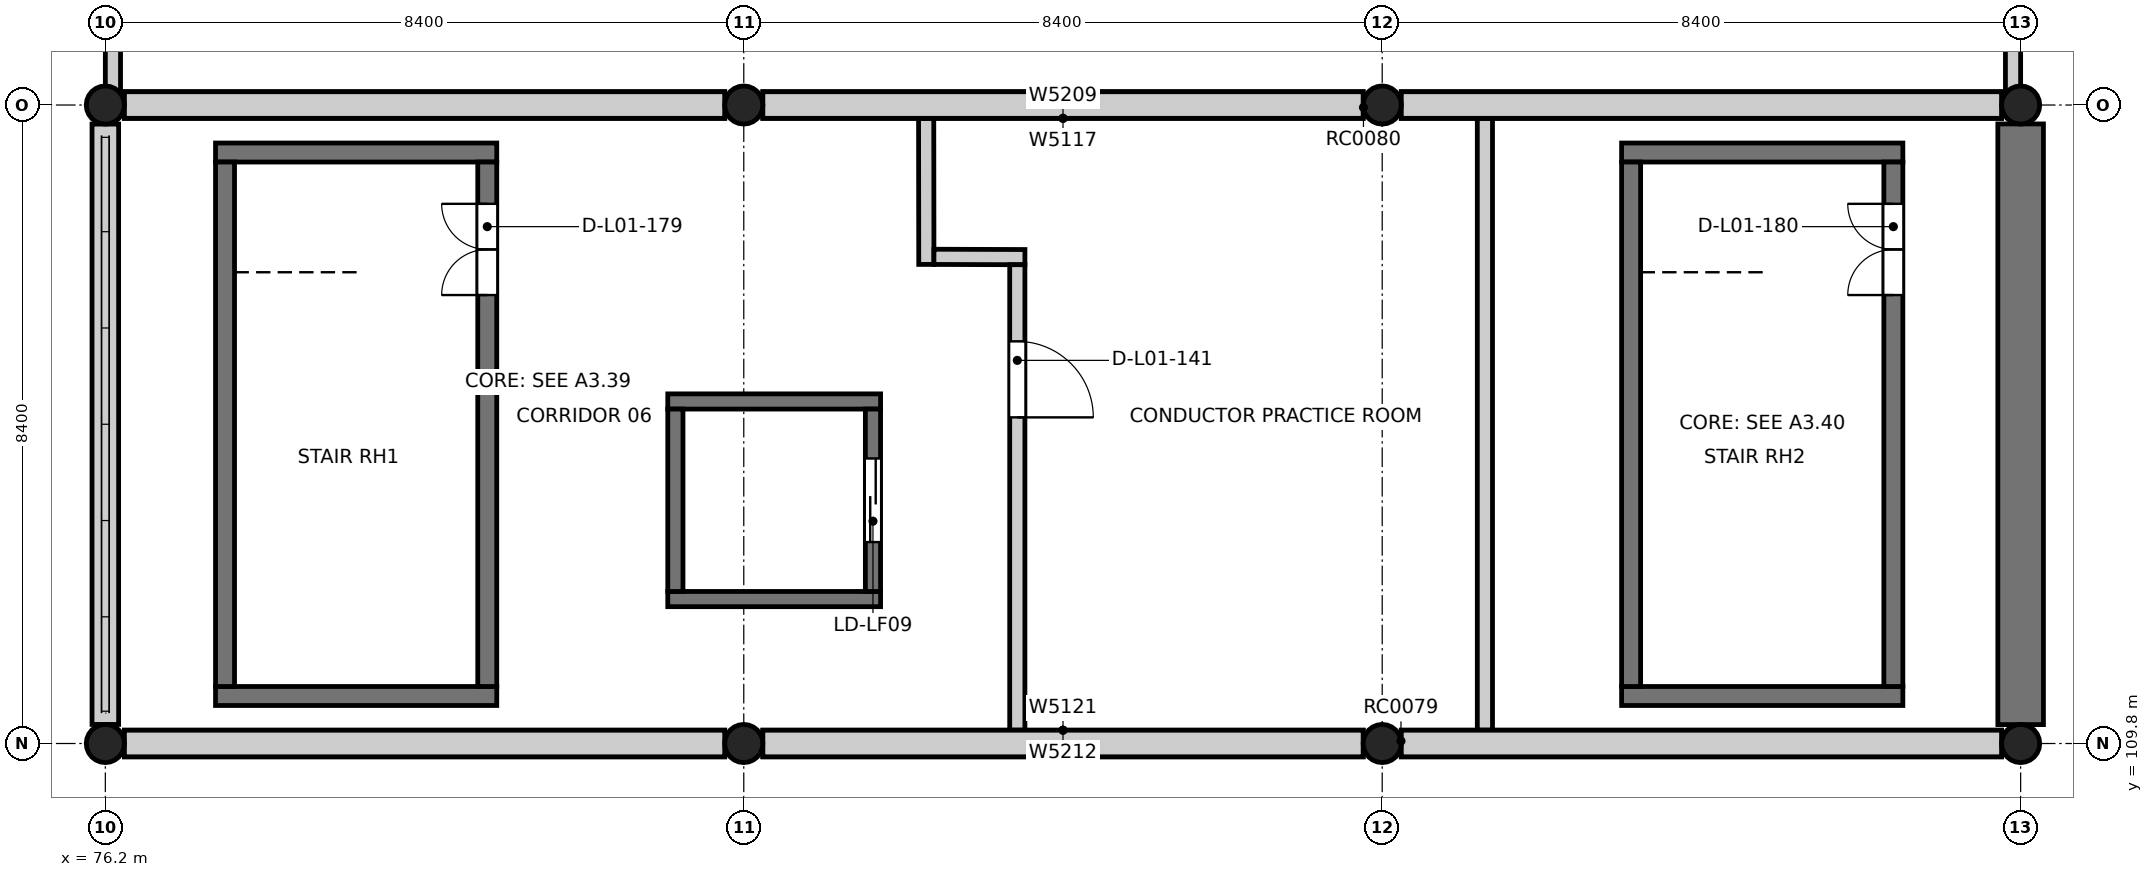
"""IFC4 building model, lengths in metres.
Left out: names, types, materials, properties, quantities, classifications, styles, units other than length and angle.
Written with IfcOpenShell. Run it as: python <this file> out.ifc"""

import sys

from ifc_helpers import new_model, si_unit, direction, frame, frame_2d, origin, origin_2d, place, context, subcontext, project, spatial, rectangle, circle, extrude, element, fill, save


model = new_model("IFC4")
c1 = context("Model", 3, precision=1e-05, world=origin(), true_north=direction((0.0, 1.0)))
c2 = subcontext(c1, "Body", "Model", "MODEL_VIEW")
j1 = project(units=[si_unit("LENGTHUNIT", "METRE"), si_unit("PLANEANGLEUNIT", "RADIAN")], contexts=[c1])
p1 = place(None, origin())
s1 = spatial("IfcSite", under=j1, at=p1, CompositionType="ELEMENT")
p2 = place(p1, origin())
s2 = spatial("IfcBuilding", under=s1, at=p2, CompositionType="ELEMENT")
p3 = place(p2, frame((0.0, 0.0, 4.8)))
s3 = spatial("IfcBuildingStorey", under=s2, at=p3, CompositionType="ELEMENT", Elevation=4.8)
for number, where, z_axis, x_axis in (
    (1, (76.2, 109.8, 0.0), (0.0, 0.0, 1.0), (1.0, 0.0, 0.0)),
    (2, (76.2, 118.2, 0.0), (0.0, 0.0, 1.0), (1.0, 0.0, 0.0)),
    (3, (84.6, 109.8, 0.0), (0.0, 0.0, 1.0), (1.0, 0.0, 0.0)),
    (4, (84.6, 118.2, 0.0), (0.0, 0.0, 1.0), (1.0, 0.0, 0.0)),
    (5, (93.0, 109.8, 0.0), (0.0, 0.0, 1.0), (1.0, 0.0, 0.0)),
    (6, (93.0, 118.2, 0.0), (0.0, 0.0, 1.0), (1.0, 0.0, 0.0)),
):
    element("IfcColumn", number, at=place(p3, frame(where, z_axis=z_axis, x_axis=x_axis)), inside=s3, PredefinedType="COLUMN", context=c2, shape_type="SweptSolid", body=[
        extrude(circle(Radius=0.25, at=origin_2d()), origin(), (0.0, 0.0, 1.0), 7.724),
    ])
for number, where, z_axis, x_axis in (
    (7, (101.4, 109.8, 0.0), (0.0, 0.0, 1.0), (1.0, 0.0, 0.0)),
    (8, (101.4, 118.2, 0.0), (0.0, 0.0, 1.0), (1.0, 0.0, 0.0)),
):
    element("IfcColumn", number, at=place(p3, frame(where, z_axis=z_axis, x_axis=x_axis)), inside=s3, PredefinedType="COLUMN", context=c2, shape_type="SweptSolid", body=[
        extrude(circle(Radius=0.25, at=origin_2d()), origin(), (0.0, 0.0, 1.0), 4.124),
    ])
p4 = place(p3, frame((101.4, 110.049, 0.0), z_axis=(0.0, 0.0, 1.0), x_axis=(0.0, 1.0, 0.0)))
e9 = element("IfcWall", 9, at=p4, inside=s3, PredefinedType="SOLIDWALL", context=c2, shape_type="SweptSolid", body=[
    extrude(rectangle(XDim=7.902, YDim=0.6, at=frame_2d((3.951, 0.0))), origin(), (0.0, 0.0, 1.0), 9.6),
])
for number, where, z_axis, x_axis in (
    (10, (77.65, 110.425, 0.0), (0.0, 0.0, 1.0), (1.0, 0.0, 0.0)),
    (11, (77.65, 117.575, 0.0), (0.0, 0.0, 1.0), (1.0, 0.0, 0.0)),
):
    element("IfcWall", number, at=place(p3, frame(where, z_axis=z_axis, x_axis=x_axis)), inside=s3, PredefinedType="SOLIDWALL", context=c2, shape_type="SweptSolid", body=[
        extrude(rectangle(XDim=3.7, YDim=0.25, at=frame_2d((1.85, 0.0))), origin(), (0.0, 0.0, 1.0), 4.8),
    ])
p5 = place(p3, frame((77.775, 110.55, 0.0), z_axis=(0.0, 0.0, 1.0), x_axis=(0.0, 1.0, 0.0)))
e12 = element("IfcWall", 12, at=p5, inside=s3, PredefinedType="SOLIDWALL", context=c2, shape_type="SweptSolid", body=[
    extrude(rectangle(XDim=6.9, YDim=0.25, at=frame_2d((3.45, 0.0))), origin(), (0.0, 0.0, 1.0), 4.8),
])
p6 = place(p3, frame((81.225, 110.55, 0.0), z_axis=(0.0, 0.0, 1.0), x_axis=(0.0, 1.0, 0.0)))
e13 = element("IfcWall", 13, at=p6, inside=s3, PredefinedType="SOLIDWALL", context=c2, shape_type="SweptSolid", body=[
    extrude(rectangle(XDim=6.9, YDim=0.25, at=frame_2d((3.45, 0.0))), origin(), (0.0, 0.0, 1.0), 4.8),
])
p7 = place(p6, frame((5.15, 0.0, 0.0)))
e14 = element("IfcOpeningElement", 14, at=p7, cuts=e13, PredefinedType="OPENING", context=c2, shape_type="SweptSolid", body=[
    extrude(rectangle(XDim=1.2, YDim=2.1, at=frame_2d((0.6, 1.05))), frame((0.0, 0.135, 0.0), z_axis=(0.0, -1.0, 0.0), x_axis=(1.0, 0.0, 0.0)), (0.0, 0.0, 1.0), 0.27),
])
for number, where, z_axis, x_axis in (
    (15, (96.15, 110.425, 0.0), (0.0, 0.0, 1.0), (1.0, 0.0, 0.0)),
    (16, (96.15, 117.575, 0.0), (0.0, 0.0, 1.0), (1.0, 0.0, 0.0)),
):
    element("IfcWall", number, at=place(p3, frame(where, z_axis=z_axis, x_axis=x_axis)), inside=s3, PredefinedType="SOLIDWALL", context=c2, shape_type="SweptSolid", body=[
        extrude(rectangle(XDim=3.7, YDim=0.25, at=frame_2d((1.85, 0.0))), origin(), (0.0, 0.0, 1.0), 4.8),
    ])
p8 = place(p3, frame((96.275, 110.55, 0.0), z_axis=(0.0, 0.0, 1.0), x_axis=(0.0, 1.0, 0.0)))
e17 = element("IfcWall", 17, at=p8, inside=s3, PredefinedType="SOLIDWALL", context=c2, shape_type="SweptSolid", body=[
    extrude(rectangle(XDim=6.9, YDim=0.25, at=frame_2d((3.45, 0.0))), origin(), (0.0, 0.0, 1.0), 4.8),
])
p9 = place(p3, frame((99.725, 110.55, 0.0), z_axis=(0.0, 0.0, 1.0), x_axis=(0.0, 1.0, 0.0)))
e18 = element("IfcWall", 18, at=p9, inside=s3, PredefinedType="SOLIDWALL", context=c2, shape_type="SweptSolid", body=[
    extrude(rectangle(XDim=6.9, YDim=0.25, at=frame_2d((3.45, 0.0))), origin(), (0.0, 0.0, 1.0), 4.8),
])
p10 = place(p9, frame((5.15, 0.0, 0.0)))
e19 = element("IfcOpeningElement", 19, at=p10, cuts=e18, PredefinedType="OPENING", context=c2, shape_type="SweptSolid", body=[
    extrude(rectangle(XDim=1.2, YDim=2.1, at=frame_2d((0.6, 1.05))), frame((0.0, 0.135, 0.0), z_axis=(0.0, -1.0, 0.0), x_axis=(1.0, 0.0, 0.0)), (0.0, 0.0, 1.0), 0.27),
])
for number, where, z_axis, x_axis in (
    (20, (83.6, 111.7, 0.0), (0.0, 0.0, 1.0), (1.0, 0.0, 0.0)),
    (21, (83.6, 114.3, 0.0), (0.0, 0.0, 1.0), (1.0, 0.0, 0.0)),
):
    element("IfcWall", number, at=place(p3, frame(where, z_axis=z_axis, x_axis=x_axis)), inside=s3, PredefinedType="SOLIDWALL", context=c2, shape_type="SweptSolid", body=[
        extrude(rectangle(XDim=2.8, YDim=0.2, at=frame_2d((1.4, 0.0))), origin(), (0.0, 0.0, 1.0), 4.8),
    ])
p11 = place(p3, frame((83.7, 111.8, 0.0), z_axis=(0.0, 0.0, 1.0), x_axis=(0.0, 1.0, 0.0)))
e22 = element("IfcWall", 22, at=p11, inside=s3, PredefinedType="SOLIDWALL", context=c2, shape_type="SweptSolid", body=[
    extrude(rectangle(XDim=2.4, YDim=0.2, at=frame_2d((1.2, 0.0))), origin(), (0.0, 0.0, 1.0), 4.8),
])
p12 = place(p3, frame((86.3, 111.8, 0.0), z_axis=(0.0, 0.0, 1.0), x_axis=(0.0, 1.0, 0.0)))
e23 = element("IfcWall", 23, at=p12, inside=s3, PredefinedType="SOLIDWALL", context=c2, shape_type="SweptSolid", body=[
    extrude(rectangle(XDim=2.4, YDim=0.2, at=frame_2d((1.2, 0.0))), origin(), (0.0, 0.0, 1.0), 4.8),
])
p13 = place(p12, frame((0.65, 0.0, 0.0)))
e24 = element("IfcOpeningElement", 24, at=p13, cuts=e23, PredefinedType="OPENING", context=c2, shape_type="SweptSolid", body=[
    extrude(rectangle(XDim=1.1, YDim=2.1, at=frame_2d((0.55, 1.05))), frame((0.0, 0.11, 0.0), z_axis=(0.0, -1.0, 0.0), x_axis=(1.0, 0.0, 0.0)), (0.0, 0.0, 1.0), 0.22),
])
p14 = place(p3, frame((87.0, 118.025, 0.0), z_axis=(0.0, 0.0, 1.0), x_axis=(0.001270324178, -0.999999193138, 0.0)))
e25 = element("IfcWall", 25, at=p14, inside=s3, PredefinedType="PARTITIONING", context=c2, shape_type="SweptSolid", body=[
    extrude(rectangle(XDim=1.922, YDim=0.2, at=frame_2d((0.961, 0.0))), origin(), (0.0, 0.0, 1.0), 4.6),
])
p15 = place(p3, frame((87.102, 116.203, 0.0), z_axis=(0.0, 0.0, 1.0), x_axis=(0.999994675452, -0.003263290803, 0.0)))
e26 = element("IfcWall", 26, at=p15, inside=s3, PredefinedType="PARTITIONING", context=c2, shape_type="SweptSolid", body=[
    extrude(rectangle(XDim=1.197, YDim=0.2, at=frame_2d((0.599, 0.0))), origin(), (0.0, 0.0, 1.0), 4.6),
])
p16 = place(p3, frame((88.199, 116.099, 0.0), z_axis=(0.0, 0.0, 1.0), x_axis=(0.0, -1.0, 0.0)))
e27 = element("IfcWall", 27, at=p16, inside=s3, PredefinedType="PARTITIONING", context=c2, shape_type="SweptSolid", body=[
    extrude(rectangle(XDim=6.124, YDim=0.2, at=frame_2d((3.062, 0.0))), origin(), (0.0, 0.0, 1.0), 4.081),
])
p17 = place(p16, frame((1.009, 0.0, 0.0)))
e28 = element("IfcOpeningElement", 28, at=p17, cuts=e27, PredefinedType="OPENING", context=c2, shape_type="SweptSolid", body=[
    extrude(rectangle(XDim=1.0, YDim=2.1, at=frame_2d((0.5, 1.05))), frame((0.0, 0.11, 0.0), z_axis=(0.0, -1.0, 0.0), x_axis=(1.0, 0.0, 0.0)), (0.0, 0.0, 1.0), 0.22),
])
p18 = place(p3, frame((94.351, 109.975, 0.0), z_axis=(0.0, 0.0, 1.0), x_axis=(0.0, 1.0, 0.0)))
e29 = element("IfcWall", 29, at=p18, inside=s3, PredefinedType="PARTITIONING", context=c2, shape_type="SweptSolid", body=[
    extrude(rectangle(XDim=8.05, YDim=0.2, at=frame_2d((4.025, 0.0))), origin(), (0.0, 0.0, 1.0), 4.23),
])
for number, where, z_axis, x_axis in (
    (30, (101.149, 118.2, 0.0), (0.0, 0.0, 1.0), (-1.0, 0.0, 0.0)),
    (31, (92.749, 118.2, 0.0), (0.0, 0.0, 1.0), (-1.0, 0.0, 0.0)),
):
    element("IfcWall", number, at=place(p3, frame(where, z_axis=z_axis, x_axis=x_axis)), inside=s3, PredefinedType="SOLIDWALL", context=c2, shape_type="SweptSolid", body=[
        extrude(rectangle(XDim=7.898, YDim=0.35, at=frame_2d((3.949, 0.0))), origin(), (0.0, 0.0, 1.0), 3.9),
    ])
p19 = place(p3, frame((84.349, 118.2, 0.0), z_axis=(0.0, 0.0, 1.0), x_axis=(-1.0, 0.0, 0.0)))
e32 = element("IfcWall", 32, at=p19, inside=s3, PredefinedType="SOLIDWALL", context=c2, shape_type="SweptSolid", body=[
    extrude(rectangle(XDim=7.898, YDim=0.35, at=frame_2d((3.949, 0.0))), origin(), (0.0, 0.0, 1.0), 3.9),
])
p20 = place(p3, frame((76.2, 117.949, 0.0), z_axis=(0.0, 0.0, 1.0), x_axis=(0.0, -1.0, 0.0)))
e33 = element("IfcWall", 33, at=p20, inside=s3, PredefinedType="SOLIDWALL", context=c2, shape_type="SweptSolid", body=[
    extrude(rectangle(XDim=7.898, YDim=0.35, at=frame_2d((3.949, 0.0))), origin(), (0.0, 0.0, 1.0), 3.9),
])
p21 = place(p3, frame((76.451, 109.8, 0.0), z_axis=(0.0, 0.0, 1.0), x_axis=(1.0, 0.0, 0.0)))
e34 = element("IfcWall", 34, at=p21, inside=s3, PredefinedType="SOLIDWALL", context=c2, shape_type="SweptSolid", body=[
    extrude(rectangle(XDim=7.898, YDim=0.35, at=frame_2d((3.949, 0.0))), origin(), (0.0, 0.0, 1.0), 3.9),
])
for number, where, z_axis, x_axis in (
    (35, (84.851, 109.8, 0.0), (0.0, 0.0, 1.0), (1.0, 0.0, 0.0)),
    (36, (93.251, 109.8, 0.0), (0.0, 0.0, 1.0), (1.0, 0.0, 0.0)),
):
    element("IfcWall", number, at=place(p3, frame(where, z_axis=z_axis, x_axis=x_axis)), inside=s3, PredefinedType="SOLIDWALL", context=c2, shape_type="SweptSolid", body=[
        extrude(rectangle(XDim=7.898, YDim=0.35, at=frame_2d((3.949, 0.0))), origin(), (0.0, 0.0, 1.0), 3.9),
    ])
for number, where, z_axis, x_axis in (
    (37, (76.3, 126.6, 0.0), (0.0, 0.0, 1.0), (0.0, -1.0, 0.0)),
    (38, (101.3, 118.21, 0.0), (0.0, 0.0, 1.0), (0.0, 1.0, 0.0)),
):
    element("IfcWall", number, at=place(p3, frame(where, z_axis=z_axis, x_axis=x_axis)), inside=s3, PredefinedType="PARAPET", context=c2, shape_type="SweptSolid", body=[
        extrude(rectangle(XDim=8.39, YDim=0.2, at=frame_2d((4.195, 0.0))), origin(), (0.0, 0.0, 1.0), 1.1),
    ])
p22 = place(p3, frame((84.349, 118.2, 3.9), z_axis=(0.0, 0.0, 1.0), x_axis=(-1.0, 0.0, 0.0)))
e39 = element("IfcWall", 39, at=p22, inside=s3, PredefinedType="SOLIDWALL", context=c2, shape_type="SweptSolid", body=[
    extrude(rectangle(XDim=7.898, YDim=0.35, at=frame_2d((3.949, 0.0))), origin(), (0.0, 0.0, 1.0), 0.136),
])
for number, where, z_axis, x_axis in (
    (40, (92.749, 118.2, 3.9), (0.0, 0.0, 1.0), (-1.0, 0.0, 0.0)),
    (41, (101.149, 118.2, 3.9), (0.0, 0.0, 1.0), (-1.0, 0.0, 0.0)),
):
    element("IfcWall", number, at=place(p3, frame(where, z_axis=z_axis, x_axis=x_axis)), inside=s3, PredefinedType="SOLIDWALL", context=c2, shape_type="SweptSolid", body=[
        extrude(rectangle(XDim=7.898, YDim=0.35, at=frame_2d((3.949, 0.0))), origin(), (0.0, 0.0, 1.0), 0.136),
    ])
p23 = place(p3, frame((76.451, 109.8, 3.9), z_axis=(0.0, 0.0, 1.0), x_axis=(1.0, 0.0, 0.0)))
e42 = element("IfcWall", 42, at=p23, inside=s3, PredefinedType="SOLIDWALL", context=c2, shape_type="SweptSolid", body=[
    extrude(rectangle(XDim=7.898, YDim=0.35, at=frame_2d((3.949, 0.0))), origin(), (0.0, 0.0, 1.0), 0.136),
])
for number, where, z_axis, x_axis in (
    (43, (84.851, 109.8, 3.9), (0.0, 0.0, 1.0), (1.0, 0.0, 0.0)),
    (44, (93.251, 109.8, 3.9), (0.0, 0.0, 1.0), (1.0, 0.0, 0.0)),
):
    element("IfcWall", number, at=place(p3, frame(where, z_axis=z_axis, x_axis=x_axis)), inside=s3, PredefinedType="SOLIDWALL", context=c2, shape_type="SweptSolid", body=[
        extrude(rectangle(XDim=7.898, YDim=0.35, at=frame_2d((3.949, 0.0))), origin(), (0.0, 0.0, 1.0), 0.136),
    ])
p24 = place(p17, origin())
e45 = element("IfcDoor", 45, at=p24, inside=s3, OperationType="SINGLE_SWING_RIGHT", PredefinedType="DOOR", context=c2, shape_type="SweptSolid", body=[
    extrude(rectangle(XDim=1.0, YDim=2.1, at=frame_2d((0.5, 1.05))), frame((0.0, 0.025, 0.0), z_axis=(0.0, -1.0, 0.0), x_axis=(1.0, 0.0, 0.0)), (0.0, 0.0, 1.0), 0.05),
])
fill(e28, e45)
p25 = place(p7, origin())
e46 = element("IfcDoor", 46, at=p25, inside=s3, OperationType="DOUBLE_DOOR_SINGLE_SWING", PredefinedType="DOOR", context=c2, shape_type="SweptSolid", body=[
    extrude(rectangle(XDim=1.2, YDim=2.1, at=frame_2d((0.6, 1.05))), frame((0.0, 0.025, 0.0), z_axis=(0.0, -1.0, 0.0), x_axis=(1.0, 0.0, 0.0)), (0.0, 0.0, 1.0), 0.05),
])
fill(e14, e46)
p26 = place(p10, origin())
e47 = element("IfcDoor", 47, at=p26, inside=s3, OperationType="DOUBLE_DOOR_SINGLE_SWING", PredefinedType="DOOR", context=c2, shape_type="SweptSolid", body=[
    extrude(rectangle(XDim=1.2, YDim=2.1, at=frame_2d((0.6, 1.05))), frame((0.0, 0.025, 0.0), z_axis=(0.0, -1.0, 0.0), x_axis=(1.0, 0.0, 0.0)), (0.0, 0.0, 1.0), 0.05),
])
fill(e19, e47)
p27 = place(p13, origin())
e48 = element("IfcDoor", 48, at=p27, inside=s3, OperationType="SLIDING_TO_LEFT", PredefinedType="DOOR", context=c2, shape_type="SweptSolid", body=[
    extrude(rectangle(XDim=1.1, YDim=2.1, at=frame_2d((0.55, 1.05))), frame((0.0, 0.025, 0.0), z_axis=(0.0, -1.0, 0.0), x_axis=(1.0, 0.0, 0.0)), (0.0, 0.0, 1.0), 0.05),
])
fill(e24, e48)
save(model, sys.argv[1])
